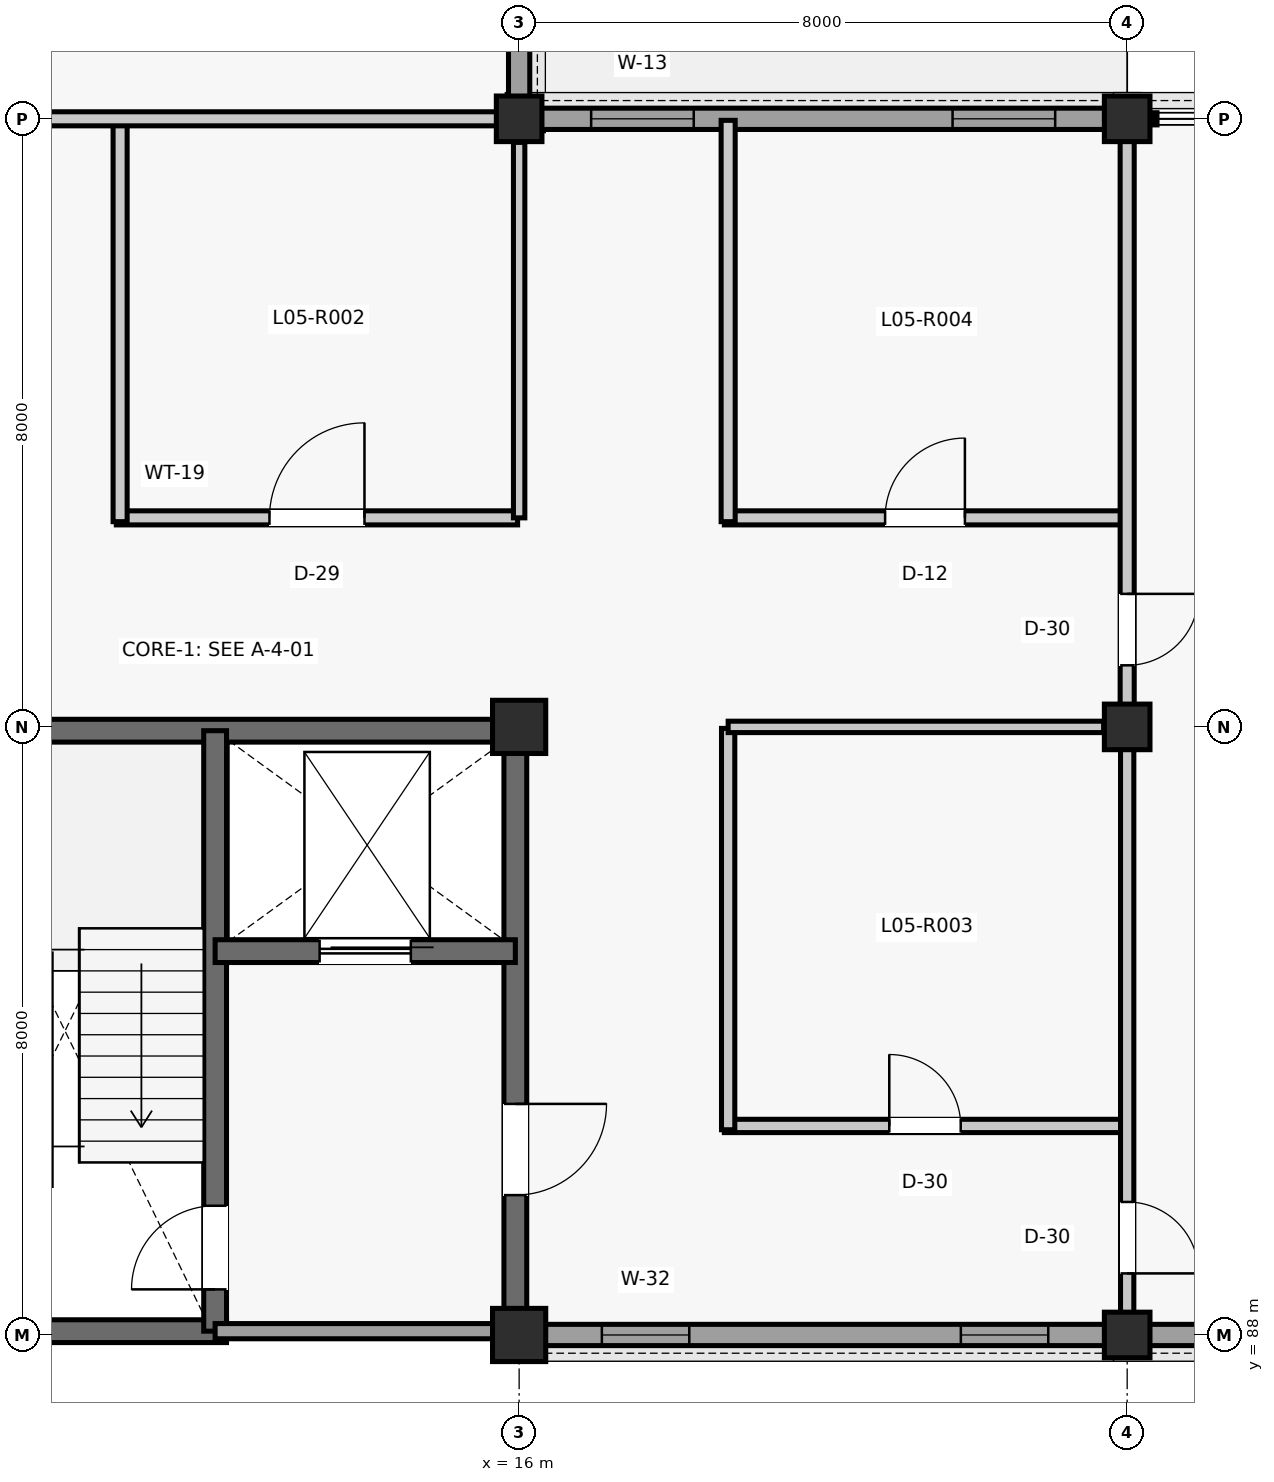
"""IFC4 building model, lengths in metres.
Left out: names, types, materials, properties, quantities, classifications, styles, units other than length and angle.
Written with IfcOpenShell. Run it as: python <this file> out.ifc"""

import sys

from ifc_helpers import new_model, si_unit, direction, frame, frame_2d, origin, origin_2d, place, context, subcontext, project, spatial, rectangle, extrude, element, fill, save


model = new_model("IFC4")
c1 = context("Model", 3, precision=1e-05, world=origin(), true_north=direction((0.0, 1.0)))
c2 = subcontext(c1, "Body", "Model", "MODEL_VIEW")
j1 = project(units=[si_unit("LENGTHUNIT", "METRE"), si_unit("PLANEANGLEUNIT", "RADIAN")], contexts=[c1])
p1 = place(None, origin())
s1 = spatial("IfcSite", under=j1, at=p1, CompositionType="ELEMENT")
p2 = place(p1, origin())
s2 = spatial("IfcBuilding", under=s1, at=p2, CompositionType="ELEMENT")
p3 = place(p2, frame((0.0, 0.0, 21.78)))
s3 = spatial("IfcBuildingStorey", under=s2, at=p3, CompositionType="ELEMENT", Elevation=21.78)
for number, where, z_axis, x_axis in (
    (1, (16.0, 88.0, 0.0), (0.0, 0.0, 1.0), (1.0, 0.0, 0.0)),
    (2, (16.0, 96.0, 0.0), (0.0, 0.0, 1.0), (1.0, 0.0, 0.0)),
):
    element("IfcColumn", number, at=place(p3, frame(where, z_axis=z_axis, x_axis=x_axis)), inside=s3, PredefinedType="COLUMN", context=c2, shape_type="SweptSolid", body=[
        extrude(rectangle(XDim=0.7, YDim=0.7, at=origin_2d()), origin(), (0.0, 0.0, 1.0), 3.96),
    ])
for number, where, z_axis, x_axis in (
    (3, (16.0, 104.0, 0.0), (0.0, 0.0, 1.0), (1.0, 0.0, 0.0)),
    (4, (24.0, 88.0, 0.0), (0.0, 0.0, 1.0), (1.0, 0.0, 0.0)),
    (5, (24.0, 96.0, 0.0), (0.0, 0.0, 1.0), (1.0, 0.0, 0.0)),
    (6, (24.0, 104.0, 0.0), (0.0, 0.0, 1.0), (1.0, 0.0, 0.0)),
):
    element("IfcColumn", number, at=place(p3, frame(where, z_axis=z_axis, x_axis=x_axis)), inside=s3, PredefinedType="COLUMN", context=c2, shape_type="SweptSolid", body=[
        extrude(rectangle(XDim=0.6, YDim=0.6, at=origin_2d()), origin(), (0.0, 0.0, 1.0), 3.96),
    ])
p4 = place(p3, frame((16.0, 104.285, 0.0), z_axis=(0.0, 0.0, 1.0), x_axis=(0.0, 1.0, 0.0)))
e7 = element("IfcWall", 7, at=p4, inside=s3, PredefinedType="SOLIDWALL", context=c2, shape_type="SweptSolid", body=[
    extrude(rectangle(XDim=7.43, YDim=0.28, at=frame_2d((3.715, 0.0))), origin(), (0.0, 0.0, 1.0), 3.259),
])
p5 = place(p4, frame((3.24, 0.0, 1.35)))
e8 = element("IfcOpeningElement", 8, at=p5, cuts=e7, PredefinedType="OPENING", context=c2, shape_type="SweptSolid", body=[
    extrude(rectangle(XDim=0.95, YDim=1.4, at=frame_2d((0.475, 0.7))), frame((0.0, 0.15, 0.0), z_axis=(0.0, -1.0, 0.0), x_axis=(1.0, 0.0, 0.0)), (0.0, 0.0, 1.0), 0.3),
])
p6 = place(p3, frame((16.335, 88.0, 0.0), z_axis=(0.0, 0.0, 1.0), x_axis=(1.0, 0.0, 0.0)))
e9 = element("IfcWall", 9, at=p6, inside=s3, PredefinedType="SOLIDWALL", context=c2, shape_type="SweptSolid", body=[
    extrude(rectangle(XDim=7.38, YDim=0.28, at=frame_2d((3.69, 0.0))), origin(), (0.0, 0.0, 1.0), 3.309),
])
p7 = place(p6, frame((0.753, 0.0, 0.95)))
e10 = element("IfcOpeningElement", 10, at=p7, cuts=e9, PredefinedType="OPENING", context=c2, shape_type="SweptSolid", body=[
    extrude(rectangle(XDim=1.15, YDim=1.65, at=frame_2d((0.575, 0.825))), frame((0.0, 0.15, 0.0), z_axis=(0.0, -1.0, 0.0), x_axis=(1.0, 0.0, 0.0)), (0.0, 0.0, 1.0), 0.3),
])
p8 = place(p6, frame((5.477, 0.0, 0.95)))
e11 = element("IfcOpeningElement", 11, at=p8, cuts=e9, PredefinedType="OPENING", context=c2, shape_type="SweptSolid", body=[
    extrude(rectangle(XDim=1.15, YDim=1.65, at=frame_2d((0.575, 0.825))), frame((0.0, 0.15, 0.0), z_axis=(0.0, -1.0, 0.0), x_axis=(1.0, 0.0, 0.0)), (0.0, 0.0, 1.0), 0.3),
])
p9 = place(p3, frame((16.285, 104.0, 0.0), z_axis=(0.0, 0.0, 1.0), x_axis=(1.0, 0.0, 0.0)))
e12 = element("IfcWall", 12, at=p9, inside=s3, PredefinedType="SOLIDWALL", context=c2, shape_type="SweptSolid", body=[
    extrude(rectangle(XDim=7.43, YDim=0.28, at=frame_2d((3.715, 0.0))), origin(), (0.0, 0.0, 1.0), 3.469),
])
p10 = place(p9, frame((0.662, 0.0, 0.95)))
e13 = element("IfcOpeningElement", 13, at=p10, cuts=e12, PredefinedType="OPENING", context=c2, shape_type="SweptSolid", body=[
    extrude(rectangle(XDim=1.35, YDim=1.9, at=frame_2d((0.675, 0.95))), frame((0.0, 0.15, 0.0), z_axis=(0.0, -1.0, 0.0), x_axis=(1.0, 0.0, 0.0)), (0.0, 0.0, 1.0), 0.3),
])
p11 = place(p9, frame((5.417, 0.0, 0.95)))
e14 = element("IfcOpeningElement", 14, at=p11, cuts=e12, PredefinedType="OPENING", context=c2, shape_type="SweptSolid", body=[
    extrude(rectangle(XDim=1.35, YDim=1.9, at=frame_2d((0.675, 0.95))), frame((0.0, 0.15, 0.0), z_axis=(0.0, -1.0, 0.0), x_axis=(1.0, 0.0, 0.0)), (0.0, 0.0, 1.0), 0.3),
])
p12 = place(p3, frame((24.285, 88.0, 0.0), z_axis=(0.0, 0.0, 1.0), x_axis=(1.0, 0.0, 0.0)))
e15 = element("IfcWall", 15, at=p12, inside=s3, PredefinedType="SOLIDWALL", context=c2, shape_type="SweptSolid", body=[
    extrude(rectangle(XDim=7.43, YDim=0.28, at=frame_2d((3.715, 0.0))), origin(), (0.0, 0.0, 1.0), 3.372),
])
p13 = place(p12, frame((2.99, 0.0, 0.9)))
e16 = element("IfcOpeningElement", 16, at=p13, cuts=e15, PredefinedType="OPENING", context=c2, shape_type="SweptSolid", body=[
    extrude(rectangle(XDim=1.45, YDim=2.15, at=frame_2d((0.725, 1.075))), frame((0.0, 0.15, 0.0), z_axis=(0.0, -1.0, 0.0), x_axis=(1.0, 0.0, 0.0)), (0.0, 0.0, 1.0), 0.3),
])
p14 = place(p3, frame((8.24, 95.95, 0.0), z_axis=(0.0, 0.0, 1.0), x_axis=(1.0, 0.0, 0.0)))
e17 = element("IfcWall", 17, at=p14, inside=s3, PredefinedType="SHEAR", context=c2, shape_type="SweptSolid", body=[
    extrude(rectangle(XDim=7.52, YDim=0.3, at=frame_2d((3.76, 0.0))), origin(), (0.0, 0.0, 1.0), 3.735),
])
p15 = place(p3, frame((15.95, 88.24, 0.0), z_axis=(0.0, 0.0, 1.0), x_axis=(0.0, 1.0, 0.0)))
e18 = element("IfcWall", 18, at=p15, inside=s3, PredefinedType="SHEAR", context=c2, shape_type="SweptSolid", body=[
    extrude(rectangle(XDim=7.52, YDim=0.3, at=frame_2d((3.76, 0.0))), origin(), (0.0, 0.0, 1.0), 3.735),
])
p16 = place(p15, frame((1.6, 0.0, 0.0)))
e19 = element("IfcOpeningElement", 19, at=p16, cuts=e18, PredefinedType="OPENING", context=c2, shape_type="SweptSolid", body=[
    extrude(rectangle(XDim=1.2, YDim=2.15, at=frame_2d((0.6, 1.075))), frame((0.0, 0.16, 0.0), z_axis=(0.0, -1.0, 0.0), x_axis=(1.0, 0.0, 0.0)), (0.0, 0.0, 1.0), 0.32),
])
p17 = place(p3, frame((8.24, 88.05, 0.0), z_axis=(0.0, 0.0, 1.0), x_axis=(1.0, 0.0, 0.0)))
e20 = element("IfcWall", 20, at=p17, inside=s3, PredefinedType="SHEAR", context=c2, shape_type="SweptSolid", body=[
    extrude(rectangle(XDim=3.91, YDim=0.3, at=frame_2d((1.955, 0.0))), origin(), (0.0, 0.0, 1.0), 3.735),
])
p18 = place(p3, frame((12.0, 88.05, 0.0), z_axis=(0.0, 0.0, 1.0), x_axis=(0.0, 1.0, 0.0)))
e21 = element("IfcWall", 21, at=p18, inside=s3, PredefinedType="SHEAR", context=c2, shape_type="SweptSolid", body=[
    extrude(rectangle(XDim=7.9, YDim=0.3, at=frame_2d((3.95, 0.0))), origin(), (0.0, 0.0, 1.0), 3.735),
])
p19 = place(p18, frame((0.55, 0.0, 0.0)))
e22 = element("IfcOpeningElement", 22, at=p19, cuts=e21, PredefinedType="OPENING", context=c2, shape_type="SweptSolid", body=[
    extrude(rectangle(XDim=1.1, YDim=2.15, at=frame_2d((0.55, 1.075))), frame((0.0, 0.16, 0.0), z_axis=(0.0, -1.0, 0.0), x_axis=(1.0, 0.0, 0.0)), (0.0, 0.0, 1.0), 0.32),
])
p20 = place(p3, frame((12.0, 93.05, 0.0), z_axis=(0.0, 0.0, 1.0), x_axis=(1.0, 0.0, 0.0)))
e23 = element("IfcWall", 23, at=p20, inside=s3, PredefinedType="SHEAR", context=c2, shape_type="SweptSolid", body=[
    extrude(rectangle(XDim=3.95, YDim=0.3, at=frame_2d((1.975, 0.0))), origin(), (0.0, 0.0, 1.0), 3.735),
])
p21 = place(p20, frame((1.375, 0.0, 0.0)))
e24 = element("IfcOpeningElement", 24, at=p21, cuts=e23, PredefinedType="OPENING", context=c2, shape_type="SweptSolid", body=[
    extrude(rectangle(XDim=1.2, YDim=2.2, at=frame_2d((0.6, 1.1))), frame((0.0, 0.16, 0.0), z_axis=(0.0, -1.0, 0.0), x_axis=(1.0, 0.0, 0.0)), (0.0, 0.0, 1.0), 0.32),
])
p22 = place(p3, frame((12.0, 88.05, 0.0), z_axis=(0.0, 0.0, 1.0), x_axis=(1.0, 0.0, 0.0)))
e25 = element("IfcWall", 25, at=p22, inside=s3, PredefinedType="PARTITIONING", context=c2, shape_type="SweptSolid", body=[
    extrude(rectangle(XDim=3.66, YDim=0.2, at=frame_2d((1.83, 0.0))), origin(), (0.0, 0.0, 1.0), 3.367),
])
p23 = place(p3, frame((10.7, 98.75, 0.0), z_axis=(0.0, 0.0, 1.0), x_axis=(1.0, 0.0, 0.0)))
e26 = element("IfcWall", 26, at=p23, inside=s3, PredefinedType="PARTITIONING", context=c2, shape_type="SweptSolid", body=[
    extrude(rectangle(XDim=5.28, YDim=0.185, at=frame_2d((2.64, 0.0))), origin(), (0.0, 0.0, 1.0), 3.41),
])
p24 = place(p23, frame((2.015, 0.0, 0.0)))
e27 = element("IfcOpeningElement", 27, at=p24, cuts=e26, PredefinedType="OPENING", context=c2, shape_type="SweptSolid", body=[
    extrude(rectangle(XDim=1.25, YDim=2.18, at=frame_2d((0.625, 1.09))), frame((0.0, 0.103, 0.0), z_axis=(0.0, -1.0, 0.0), x_axis=(1.0, 0.0, 0.0)), (0.0, 0.0, 1.0), 0.205),
])
p25 = place(p3, frame((10.75, 98.7, 0.0), z_axis=(0.0, 0.0, 1.0), x_axis=(0.0, 1.0, 0.0)))
e28 = element("IfcWall", 28, at=p25, inside=s3, PredefinedType="PARTITIONING", context=c2, shape_type="SweptSolid", body=[
    extrude(rectangle(XDim=5.28, YDim=0.185, at=frame_2d((2.64, 0.0))), origin(), (0.0, 0.0, 1.0), 3.251),
])
p26 = place(p3, frame((16.0, 98.75, 0.0), z_axis=(0.0, 0.0, 1.0), x_axis=(0.0, 1.0, 0.0)))
e29 = element("IfcWall", 29, at=p26, inside=s3, PredefinedType="PARTITIONING", context=c2, shape_type="SweptSolid", body=[
    extrude(rectangle(XDim=4.94, YDim=0.15, at=frame_2d((2.47, 0.0))), origin(), (0.0, 0.0, 1.0), 3.462),
])
p27 = place(p3, frame((18.7, 90.75, 0.0), z_axis=(0.0, 0.0, 1.0), x_axis=(1.0, 0.0, 0.0)))
e30 = element("IfcWall", 30, at=p27, inside=s3, PredefinedType="PARTITIONING", context=c2, shape_type="SweptSolid", body=[
    extrude(rectangle(XDim=5.28, YDim=0.175, at=frame_2d((2.64, 0.0))), origin(), (0.0, 0.0, 1.0), 3.405),
])
p28 = place(p27, frame((2.17, 0.0, 0.0)))
e31 = element("IfcOpeningElement", 31, at=p28, cuts=e30, PredefinedType="OPENING", context=c2, shape_type="SweptSolid", body=[
    extrude(rectangle(XDim=0.94, YDim=2.12, at=frame_2d((0.47, 1.06))), frame((0.0, 0.097, 0.0), z_axis=(0.0, -1.0, 0.0), x_axis=(1.0, 0.0, 0.0)), (0.0, 0.0, 1.0), 0.195),
])
p29 = place(p3, frame((18.75, 90.7, 0.0), z_axis=(0.0, 0.0, 1.0), x_axis=(0.0, 1.0, 0.0)))
e32 = element("IfcWall", 32, at=p29, inside=s3, PredefinedType="PARTITIONING", context=c2, shape_type="SweptSolid", body=[
    extrude(rectangle(XDim=5.28, YDim=0.175, at=frame_2d((2.64, 0.0))), origin(), (0.0, 0.0, 1.0), 3.251),
])
p30 = place(p3, frame((18.75, 96.0, 0.0), z_axis=(0.0, 0.0, 1.0), x_axis=(1.0, 0.0, 0.0)))
e33 = element("IfcWall", 33, at=p30, inside=s3, PredefinedType="PARTITIONING", context=c2, shape_type="SweptSolid", body=[
    extrude(rectangle(XDim=4.94, YDim=0.15, at=frame_2d((2.47, 0.0))), origin(), (0.0, 0.0, 1.0), 3.251),
])
p31 = place(p3, frame((18.7, 98.75, 0.0), z_axis=(0.0, 0.0, 1.0), x_axis=(1.0, 0.0, 0.0)))
e34 = element("IfcWall", 34, at=p31, inside=s3, PredefinedType="PARTITIONING", context=c2, shape_type="SweptSolid", body=[
    extrude(rectangle(XDim=5.28, YDim=0.185, at=frame_2d((2.64, 0.0))), origin(), (0.0, 0.0, 1.0), 3.257),
])
p32 = place(p31, frame((2.115, 0.0, 0.0)))
e35 = element("IfcOpeningElement", 35, at=p32, cuts=e34, PredefinedType="OPENING", context=c2, shape_type="SweptSolid", body=[
    extrude(rectangle(XDim=1.05, YDim=2.15, at=frame_2d((0.525, 1.075))), frame((0.0, 0.103, 0.0), z_axis=(0.0, -1.0, 0.0), x_axis=(1.0, 0.0, 0.0)), (0.0, 0.0, 1.0), 0.205),
])
p33 = place(p3, frame((18.75, 98.7, 0.0), z_axis=(0.0, 0.0, 1.0), x_axis=(0.0, 1.0, 0.0)))
e36 = element("IfcWall", 36, at=p33, inside=s3, PredefinedType="PARTITIONING", context=c2, shape_type="SweptSolid", body=[
    extrude(rectangle(XDim=5.28, YDim=0.185, at=frame_2d((2.64, 0.0))), origin(), (0.0, 0.0, 1.0), 3.414),
])
p34 = place(p3, frame((8.29, 104.0, 0.0), z_axis=(0.0, 0.0, 1.0), x_axis=(1.0, 0.0, 0.0)))
e37 = element("IfcWall", 37, at=p34, inside=s3, PredefinedType="PARTITIONING", context=c2, shape_type="SweptSolid", body=[
    extrude(rectangle(XDim=7.42, YDim=0.185, at=frame_2d((3.71, 0.0))), origin(), (0.0, 0.0, 1.0), 3.251),
])
p35 = place(p34, frame((0.52, 0.0, 0.0)))
e38 = element("IfcOpeningElement", 38, at=p35, cuts=e37, PredefinedType="OPENING", context=c2, shape_type="SweptSolid", body=[
    extrude(rectangle(XDim=0.94, YDim=2.12, at=frame_2d((0.47, 1.06))), frame((0.0, 0.103, 0.0), z_axis=(0.0, -1.0, 0.0), x_axis=(1.0, 0.0, 0.0)), (0.0, 0.0, 1.0), 0.205),
])
p36 = place(p3, frame((24.0, 88.29, 0.0), z_axis=(0.0, 0.0, 1.0), x_axis=(0.0, 1.0, 0.0)))
e39 = element("IfcWall", 39, at=p36, inside=s3, PredefinedType="PARTITIONING", context=c2, shape_type="SweptSolid", body=[
    extrude(rectangle(XDim=7.42, YDim=0.175, at=frame_2d((3.71, 0.0))), origin(), (0.0, 0.0, 1.0), 3.457),
])
p37 = place(p36, frame((0.52, 0.0, 0.0)))
e40 = element("IfcOpeningElement", 40, at=p37, cuts=e39, PredefinedType="OPENING", context=c2, shape_type="SweptSolid", body=[
    extrude(rectangle(XDim=0.94, YDim=2.12, at=frame_2d((0.47, 1.06))), frame((0.0, 0.097, 0.0), z_axis=(0.0, -1.0, 0.0), x_axis=(1.0, 0.0, 0.0)), (0.0, 0.0, 1.0), 0.195),
])
p38 = place(p3, frame((24.0, 96.29, 0.0), z_axis=(0.0, 0.0, 1.0), x_axis=(0.0, 1.0, 0.0)))
e41 = element("IfcWall", 41, at=p38, inside=s3, PredefinedType="PARTITIONING", context=c2, shape_type="SweptSolid", body=[
    extrude(rectangle(XDim=7.42, YDim=0.185, at=frame_2d((3.71, 0.0))), origin(), (0.0, 0.0, 1.0), 3.257),
])
p39 = place(p38, frame((0.52, 0.0, 0.0)))
e42 = element("IfcOpeningElement", 42, at=p39, cuts=e41, PredefinedType="OPENING", context=c2, shape_type="SweptSolid", body=[
    extrude(rectangle(XDim=0.94, YDim=2.12, at=frame_2d((0.47, 1.06))), frame((0.0, 0.103, 0.0), z_axis=(0.0, -1.0, 0.0), x_axis=(1.0, 0.0, 0.0)), (0.0, 0.0, 1.0), 0.205),
])
p40 = place(p7, origin())
e43 = element("IfcWindow", 43, at=p40, inside=s3, PartitioningType="SINGLE_PANEL", PredefinedType="WINDOW", context=c2, shape_type="SweptSolid", body=[
    extrude(rectangle(XDim=1.15, YDim=1.65, at=frame_2d((0.575, 0.825))), frame((0.0, 0.03, 0.0), z_axis=(0.0, -1.0, 0.0), x_axis=(1.0, 0.0, 0.0)), (0.0, 0.0, 1.0), 0.06),
])
fill(e10, e43)
p41 = place(p8, origin())
e44 = element("IfcWindow", 44, at=p41, inside=s3, PartitioningType="SINGLE_PANEL", PredefinedType="WINDOW", context=c2, shape_type="SweptSolid", body=[
    extrude(rectangle(XDim=1.15, YDim=1.65, at=frame_2d((0.575, 0.825))), frame((0.0, 0.03, 0.0), z_axis=(0.0, -1.0, 0.0), x_axis=(1.0, 0.0, 0.0)), (0.0, 0.0, 1.0), 0.06),
])
fill(e11, e44)
p42 = place(p10, origin())
e45 = element("IfcWindow", 45, at=p42, inside=s3, PartitioningType="SINGLE_PANEL", PredefinedType="WINDOW", context=c2, shape_type="SweptSolid", body=[
    extrude(rectangle(XDim=1.35, YDim=1.9, at=frame_2d((0.675, 0.95))), frame((0.0, 0.03, 0.0), z_axis=(0.0, -1.0, 0.0), x_axis=(1.0, 0.0, 0.0)), (0.0, 0.0, 1.0), 0.06),
])
fill(e13, e45)
p43 = place(p11, origin())
e46 = element("IfcWindow", 46, at=p43, inside=s3, PartitioningType="SINGLE_PANEL", PredefinedType="WINDOW", context=c2, shape_type="SweptSolid", body=[
    extrude(rectangle(XDim=1.35, YDim=1.9, at=frame_2d((0.675, 0.95))), frame((0.0, 0.03, 0.0), z_axis=(0.0, -1.0, 0.0), x_axis=(1.0, 0.0, 0.0)), (0.0, 0.0, 1.0), 0.06),
])
fill(e14, e46)
p44 = place(p19, origin())
e47 = element("IfcDoor", 47, at=p44, inside=s3, OperationType="SINGLE_SWING_LEFT", PredefinedType="DOOR", context=c2, shape_type="SweptSolid", body=[
    extrude(rectangle(XDim=1.1, YDim=2.15, at=frame_2d((0.55, 1.075))), frame((0.0, 0.025, 0.0), z_axis=(0.0, -1.0, 0.0), x_axis=(1.0, 0.0, 0.0)), (0.0, 0.0, 1.0), 0.05),
])
fill(e22, e47)
p45 = place(p21, origin())
e48 = element("IfcDoor", 48, at=p45, inside=s3, OperationType="SLIDING_TO_LEFT", PredefinedType="DOOR", context=c2, shape_type="SweptSolid", body=[
    extrude(rectangle(XDim=1.2, YDim=2.2, at=frame_2d((0.6, 1.1))), frame((0.0, 0.025, 0.0), z_axis=(0.0, -1.0, 0.0), x_axis=(1.0, 0.0, 0.0)), (0.0, 0.0, 1.0), 0.05),
])
fill(e24, e48)
p46 = place(p16, frame((1.2, 0.0, 0.0), z_axis=(0.0, 0.0, 1.0), x_axis=(-1.0, 0.0, 0.0)))
e49 = element("IfcDoor", 49, at=p46, inside=s3, OperationType="SINGLE_SWING_RIGHT", PredefinedType="DOOR", context=c2, shape_type="SweptSolid", body=[
    extrude(rectangle(XDim=1.2, YDim=2.15, at=frame_2d((0.6, 1.075))), frame((0.0, 0.025, 0.0), z_axis=(0.0, -1.0, 0.0), x_axis=(1.0, 0.0, 0.0)), (0.0, 0.0, 1.0), 0.05),
])
fill(e19, e49)
p47 = place(p24, origin())
e50 = element("IfcDoor", 50, at=p47, inside=s3, OperationType="SINGLE_SWING_RIGHT", PredefinedType="DOOR", context=c2, shape_type="SweptSolid", body=[
    extrude(rectangle(XDim=1.25, YDim=2.18, at=frame_2d((0.625, 1.09))), frame((0.0, 0.025, 0.0), z_axis=(0.0, -1.0, 0.0), x_axis=(1.0, 0.0, 0.0)), (0.0, 0.0, 1.0), 0.05),
])
fill(e27, e50)
p48 = place(p28, origin())
e51 = element("IfcDoor", 51, at=p48, inside=s3, OperationType="SINGLE_SWING_LEFT", PredefinedType="DOOR", context=c2, shape_type="SweptSolid", body=[
    extrude(rectangle(XDim=0.94, YDim=2.12, at=frame_2d((0.47, 1.06))), frame((0.0, 0.025, 0.0), z_axis=(0.0, -1.0, 0.0), x_axis=(1.0, 0.0, 0.0)), (0.0, 0.0, 1.0), 0.05),
])
fill(e31, e51)
p49 = place(p32, origin())
e52 = element("IfcDoor", 52, at=p49, inside=s3, OperationType="SINGLE_SWING_RIGHT", PredefinedType="DOOR", context=c2, shape_type="SweptSolid", body=[
    extrude(rectangle(XDim=1.05, YDim=2.15, at=frame_2d((0.525, 1.075))), frame((0.0, 0.025, 0.0), z_axis=(0.0, -1.0, 0.0), x_axis=(1.0, 0.0, 0.0)), (0.0, 0.0, 1.0), 0.05),
])
fill(e35, e52)
p50 = place(p37, frame((0.94, 0.0, 0.0), z_axis=(0.0, 0.0, 1.0), x_axis=(-1.0, 0.0, 0.0)))
e53 = element("IfcDoor", 53, at=p50, inside=s3, OperationType="SINGLE_SWING_LEFT", PredefinedType="DOOR", context=c2, shape_type="SweptSolid", body=[
    extrude(rectangle(XDim=0.94, YDim=2.12, at=frame_2d((0.47, 1.06))), frame((0.0, 0.025, 0.0), z_axis=(0.0, -1.0, 0.0), x_axis=(1.0, 0.0, 0.0)), (0.0, 0.0, 1.0), 0.05),
])
fill(e40, e53)
p51 = place(p39, frame((0.94, 0.0, 0.0), z_axis=(0.0, 0.0, 1.0), x_axis=(-1.0, 0.0, 0.0)))
e54 = element("IfcDoor", 54, at=p51, inside=s3, OperationType="SINGLE_SWING_RIGHT", PredefinedType="DOOR", context=c2, shape_type="SweptSolid", body=[
    extrude(rectangle(XDim=0.94, YDim=2.12, at=frame_2d((0.47, 1.06))), frame((0.0, 0.025, 0.0), z_axis=(0.0, -1.0, 0.0), x_axis=(1.0, 0.0, 0.0)), (0.0, 0.0, 1.0), 0.05),
])
fill(e42, e54)
save(model, sys.argv[1])
